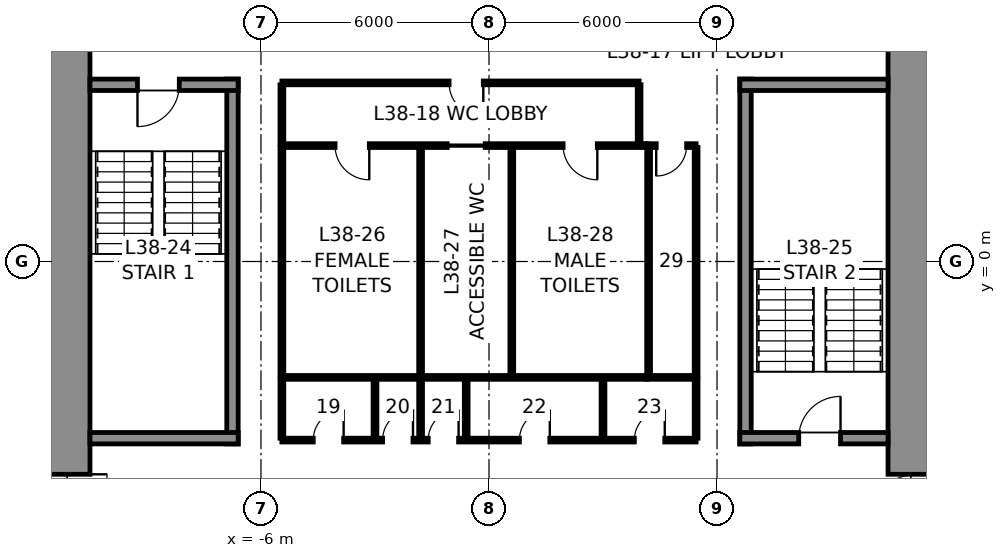
"""IFC4 building model, lengths in metres.
Left out: names, types, materials, properties, quantities, classifications, styles, units other than length and angle.
Written with IfcOpenShell. Run it as: python <this file> out.ifc"""

import sys

from ifc_helpers import new_model, si_unit, direction, frame, frame_2d, origin, place, context, subcontext, project, spatial, rectangle, extrude, element, fill, save


model = new_model("IFC4")
c1 = context("Model", 3, precision=1e-05, world=origin(), true_north=direction((0.0, 1.0)))
c2 = subcontext(c1, "Body", "Model", "MODEL_VIEW")
j1 = project(units=[si_unit("LENGTHUNIT", "METRE"), si_unit("PLANEANGLEUNIT", "RADIAN")], contexts=[c1])
p1 = place(None, origin())
s1 = spatial("IfcSite", under=j1, at=p1, CompositionType="ELEMENT")
p2 = place(p1, origin())
s2 = spatial("IfcBuilding", under=s1, at=p2, CompositionType="ELEMENT")
p3 = place(p2, frame((0.0, 0.0, 179.8)))
s3 = spatial("IfcBuildingStorey", under=s2, at=p3, CompositionType="ELEMENT", Elevation=179.8)
p4 = place(p3, frame((11.25, 10.5, 0.0), z_axis=(0.0, 0.0, 1.0), x_axis=(0.0, -1.0, 0.0)))
e1 = element("IfcWall", 1, at=p4, inside=s3, PredefinedType="SHEAR", context=c2, shape_type="SweptSolid", body=[
    extrude(rectangle(XDim=21.0, YDim=1.5, at=frame_2d((10.5, 0.0))), origin(), (0.0, 0.0, 1.0), 4.0),
])
p5 = place(p4, frame((3.7, 0.0, 0.0)))
e2 = element("IfcOpeningElement", 2, at=p5, cuts=e1, PredefinedType="OPENING", context=c2, shape_type="SweptSolid", body=[
    extrude(rectangle(XDim=1.2, YDim=2.3, at=frame_2d((0.6, 1.15))), frame((0.0, 0.76, 0.0), z_axis=(0.0, -1.0, 0.0), x_axis=(1.0, 0.0, 0.0)), (0.0, 0.0, 1.0), 1.52),
])
p6 = place(p4, frame((16.1, 0.0, 0.0)))
e3 = element("IfcOpeningElement", 3, at=p6, cuts=e1, PredefinedType="OPENING", context=c2, shape_type="SweptSolid", body=[
    extrude(rectangle(XDim=1.2, YDim=2.3, at=frame_2d((0.6, 1.15))), frame((0.0, 0.76, 0.0), z_axis=(0.0, -1.0, 0.0), x_axis=(1.0, 0.0, 0.0)), (0.0, 0.0, 1.0), 1.52),
])
p7 = place(p3, frame((-11.25, -10.5, 0.0), z_axis=(0.0, 0.0, 1.0), x_axis=(0.0, 1.0, 0.0)))
e4 = element("IfcWall", 4, at=p7, inside=s3, PredefinedType="SHEAR", context=c2, shape_type="SweptSolid", body=[
    extrude(rectangle(XDim=21.0, YDim=1.5, at=frame_2d((10.5, 0.0))), origin(), (0.0, 0.0, 1.0), 4.0),
])
p8 = place(p7, frame((16.1, 0.0, 0.0)))
e5 = element("IfcOpeningElement", 5, at=p8, cuts=e4, PredefinedType="OPENING", context=c2, shape_type="SweptSolid", body=[
    extrude(rectangle(XDim=1.2, YDim=2.3, at=frame_2d((0.6, 1.15))), frame((0.0, 0.76, 0.0), z_axis=(0.0, -1.0, 0.0), x_axis=(1.0, 0.0, 0.0)), (0.0, 0.0, 1.0), 1.52),
])
p9 = place(p7, frame((3.7, 0.0, 0.0)))
e6 = element("IfcOpeningElement", 6, at=p9, cuts=e4, PredefinedType="OPENING", context=c2, shape_type="SweptSolid", body=[
    extrude(rectangle(XDim=1.2, YDim=2.3, at=frame_2d((0.6, 1.15))), frame((0.0, 0.76, 0.0), z_axis=(0.0, -1.0, 0.0), x_axis=(1.0, 0.0, 0.0)), (0.0, 0.0, 1.0), 1.52),
])
p10 = place(p3, frame((-6.75, -4.8, 0.0), z_axis=(0.0, 0.0, 1.0), x_axis=(0.0, 1.0, 0.0)))
e7 = element("IfcWall", 7, at=p10, inside=s3, PredefinedType="SOLIDWALL", context=c2, shape_type="SweptSolid", body=[
    extrude(rectangle(XDim=9.6, YDim=0.3, at=frame_2d((4.8, 0.0))), origin(), (0.0, 0.0, 1.0), 3.75),
])
p11 = place(p3, frame((-10.5, 4.65, 0.0), z_axis=(0.0, 0.0, 1.0), x_axis=(1.0, 0.0, 0.0)))
e8 = element("IfcWall", 8, at=p11, inside=s3, PredefinedType="SOLIDWALL", context=c2, shape_type="SweptSolid", body=[
    extrude(rectangle(XDim=3.9, YDim=0.3, at=frame_2d((1.95, 0.0))), origin(), (0.0, 0.0, 1.0), 3.75),
])
p12 = place(p11, frame((1.25, 0.0, 0.0)))
e9 = element("IfcOpeningElement", 9, at=p12, cuts=e8, PredefinedType="OPENING", context=c2, shape_type="SweptSolid", body=[
    extrude(rectangle(XDim=1.1, YDim=2.3, at=frame_2d((0.55, 1.15))), frame((0.0, 0.16, 0.0), z_axis=(0.0, -1.0, 0.0), x_axis=(1.0, 0.0, 0.0)), (0.0, 0.0, 1.0), 0.32),
])
p13 = place(p3, frame((-6.6, -4.65, 0.0), z_axis=(0.0, 0.0, 1.0), x_axis=(-1.0, 0.0, 0.0)))
e10 = element("IfcWall", 10, at=p13, inside=s3, PredefinedType="SOLIDWALL", context=c2, shape_type="SweptSolid", body=[
    extrude(rectangle(XDim=3.9, YDim=0.3, at=frame_2d((1.95, 0.0))), origin(), (0.0, 0.0, 1.0), 3.75),
])
p14 = place(p3, frame((6.75, -4.8, 0.0), z_axis=(0.0, 0.0, 1.0), x_axis=(0.0, 1.0, 0.0)))
e11 = element("IfcWall", 11, at=p14, inside=s3, PredefinedType="SOLIDWALL", context=c2, shape_type="SweptSolid", body=[
    extrude(rectangle(XDim=9.6, YDim=0.3, at=frame_2d((4.8, 0.0))), origin(), (0.0, 0.0, 1.0), 3.75),
])
p15 = place(p3, frame((6.6, 4.65, 0.0), z_axis=(0.0, 0.0, 1.0), x_axis=(1.0, 0.0, 0.0)))
e12 = element("IfcWall", 12, at=p15, inside=s3, PredefinedType="SOLIDWALL", context=c2, shape_type="SweptSolid", body=[
    extrude(rectangle(XDim=3.9, YDim=0.3, at=frame_2d((1.95, 0.0))), origin(), (0.0, 0.0, 1.0), 3.75),
])
p16 = place(p3, frame((10.5, -4.65, 0.0), z_axis=(0.0, 0.0, 1.0), x_axis=(-1.0, 0.0, 0.0)))
e13 = element("IfcWall", 13, at=p16, inside=s3, PredefinedType="SOLIDWALL", context=c2, shape_type="SweptSolid", body=[
    extrude(rectangle(XDim=3.9, YDim=0.3, at=frame_2d((1.95, 0.0))), origin(), (0.0, 0.0, 1.0), 3.75),
])
p17 = place(p16, frame((1.25, 0.0, 0.0)))
e14 = element("IfcOpeningElement", 14, at=p17, cuts=e13, PredefinedType="OPENING", context=c2, shape_type="SweptSolid", body=[
    extrude(rectangle(XDim=1.1, YDim=2.3, at=frame_2d((0.55, 1.15))), frame((0.0, 0.16, 0.0), z_axis=(0.0, -1.0, 0.0), x_axis=(1.0, 0.0, 0.0)), (0.0, 0.0, 1.0), 0.32),
])
p18 = place(p3, frame((-5.45, 3.05, 0.0), z_axis=(0.0, 0.0, 1.0), x_axis=(1.0, 0.0, 0.0)))
e15 = element("IfcWall", 15, at=p18, inside=s3, PredefinedType="PARTITIONING", context=c2, shape_type="SweptSolid", body=[
    extrude(rectangle(XDim=9.6, YDim=0.1, at=frame_2d((4.8, 0.0))), origin(), (0.0, 0.0, 1.0), 3.75),
])
p19 = place(p18, frame((1.4, 0.0, 0.0)))
e16 = element("IfcOpeningElement", 16, at=p19, cuts=e15, PredefinedType="OPENING", context=c2, shape_type="SweptSolid", body=[
    extrude(rectangle(XDim=0.9, YDim=2.3, at=frame_2d((0.45, 1.15))), frame((0.0, 0.06, 0.0), z_axis=(0.0, -1.0, 0.0), x_axis=(1.0, 0.0, 0.0)), (0.0, 0.0, 1.0), 0.12),
])
p20 = place(p18, frame((4.35, 0.0, 0.0)))
e17 = element("IfcOpeningElement", 17, at=p20, cuts=e15, PredefinedType="OPENING", context=c2, shape_type="SweptSolid", body=[
    extrude(rectangle(XDim=1.0, YDim=2.3, at=frame_2d((0.5, 1.15))), frame((0.0, 0.06, 0.0), z_axis=(0.0, -1.0, 0.0), x_axis=(1.0, 0.0, 0.0)), (0.0, 0.0, 1.0), 0.12),
])
p21 = place(p18, frame((7.4, 0.0, 0.0)))
e18 = element("IfcOpeningElement", 18, at=p21, cuts=e15, PredefinedType="OPENING", context=c2, shape_type="SweptSolid", body=[
    extrude(rectangle(XDim=0.9, YDim=2.3, at=frame_2d((0.45, 1.15))), frame((0.0, 0.06, 0.0), z_axis=(0.0, -1.0, 0.0), x_axis=(1.0, 0.0, 0.0)), (0.0, 0.0, 1.0), 0.12),
])
p22 = place(p3, frame((4.15, 3.05, 0.0), z_axis=(0.0, 0.0, 1.0), x_axis=(1.0, 0.0, 0.0)))
e19 = element("IfcWall", 19, at=p22, inside=s3, PredefinedType="PARTITIONING", context=c2, shape_type="SweptSolid", body=[
    extrude(rectangle(XDim=1.3, YDim=0.1, at=frame_2d((0.65, 0.0))), origin(), (0.0, 0.0, 1.0), 3.75),
])
p23 = place(p22, frame((0.25, 0.0, 0.0)))
e20 = element("IfcOpeningElement", 20, at=p23, cuts=e19, PredefinedType="OPENING", context=c2, shape_type="SweptSolid", body=[
    extrude(rectangle(XDim=0.8, YDim=2.3, at=frame_2d((0.4, 1.15))), frame((0.0, 0.06, 0.0), z_axis=(0.0, -1.0, 0.0), x_axis=(1.0, 0.0, 0.0)), (0.0, 0.0, 1.0), 0.12),
])
p24 = place(p3, frame((4.15, -3.05, 0.0), z_axis=(0.0, 0.0, 1.0), x_axis=(-1.0, 0.0, 0.0)))
e21 = element("IfcWall", 21, at=p24, inside=s3, PredefinedType="PARTITIONING", context=c2, shape_type="SweptSolid", body=[
    extrude(rectangle(XDim=9.6, YDim=0.1, at=frame_2d((4.8, 0.0))), origin(), (0.0, 0.0, 1.0), 3.75),
])
p25 = place(p3, frame((5.45, -3.05, 0.0), z_axis=(0.0, 0.0, 1.0), x_axis=(-1.0, 0.0, 0.0)))
e22 = element("IfcWall", 22, at=p25, inside=s3, PredefinedType="PARTITIONING", context=c2, shape_type="SweptSolid", body=[
    extrude(rectangle(XDim=1.3, YDim=0.1, at=frame_2d((0.65, 0.0))), origin(), (0.0, 0.0, 1.0), 3.75),
])
for number, where, z_axis, x_axis in (
    (23, (5.45, 3.0, 0.0), (0.0, 0.0, 1.0), (0.0, -1.0, 0.0)),
    (24, (-5.45, -3.0, 0.0), (0.0, 0.0, 1.0), (0.0, 1.0, 0.0)),
    (25, (-1.8, -3.0, 0.0), (0.0, 0.0, 1.0), (0.0, 1.0, 0.0)),
    (26, (0.6, -3.0, 0.0), (0.0, 0.0, 1.0), (0.0, 1.0, 0.0)),
    (27, (4.2, -3.0, 0.0), (0.0, 0.0, 1.0), (0.0, 1.0, 0.0)),
):
    element("IfcWall", number, at=place(p3, frame(where, z_axis=z_axis, x_axis=x_axis)), inside=s3, PredefinedType="PARTITIONING", context=c2, shape_type="SweptSolid", body=[
        extrude(rectangle(XDim=6.0, YDim=0.1, at=frame_2d((3.0, 0.0))), origin(), (0.0, 0.0, 1.0), 3.75),
    ])
p26 = place(p3, frame((-5.45, 4.7, 0.0), z_axis=(0.0, 0.0, 1.0), x_axis=(1.0, 0.0, 0.0)))
e28 = element("IfcWall", 28, at=p26, inside=s3, PredefinedType="PARTITIONING", context=c2, shape_type="SweptSolid", body=[
    extrude(rectangle(XDim=9.4, YDim=0.1, at=frame_2d((4.7, 0.0))), origin(), (0.0, 0.0, 1.0), 3.75),
])
p27 = place(p26, frame((4.4, 0.0, 0.0)))
e29 = element("IfcOpeningElement", 29, at=p27, cuts=e28, PredefinedType="OPENING", context=c2, shape_type="SweptSolid", body=[
    extrude(rectangle(XDim=0.9, YDim=2.3, at=frame_2d((0.45, 1.15))), frame((0.0, 0.06, 0.0), z_axis=(0.0, -1.0, 0.0), x_axis=(1.0, 0.0, 0.0)), (0.0, 0.0, 1.0), 0.12),
])
for number, where, z_axis, x_axis in (
    (30, (-5.45, 3.1, 0.0), (0.0, 0.0, 1.0), (0.0, 1.0, 0.0)),
    (31, (3.95, 3.1, 0.0), (0.0, 0.0, 1.0), (0.0, 1.0, 0.0)),
):
    element("IfcWall", number, at=place(p3, frame(where, z_axis=z_axis, x_axis=x_axis)), inside=s3, PredefinedType="PARTITIONING", context=c2, shape_type="SweptSolid", body=[
        extrude(rectangle(XDim=1.55, YDim=0.1, at=frame_2d((0.775, 0.0))), origin(), (0.0, 0.0, 1.0), 3.75),
    ])
p28 = place(p3, frame((5.45, -4.7, 0.0), z_axis=(0.0, 0.0, 1.0), x_axis=(-1.0, 0.0, 0.0)))
e32 = element("IfcWall", 32, at=p28, inside=s3, PredefinedType="PARTITIONING", context=c2, shape_type="SweptSolid", body=[
    extrude(rectangle(XDim=10.9, YDim=0.1, at=frame_2d((5.45, 0.0))), origin(), (0.0, 0.0, 1.0), 3.75),
])
p29 = place(p28, frame((9.275, 0.0, 0.0)))
e33 = element("IfcOpeningElement", 33, at=p29, cuts=e32, PredefinedType="OPENING", context=c2, shape_type="SweptSolid", body=[
    extrude(rectangle(XDim=0.8, YDim=2.3, at=frame_2d((0.4, 1.15))), frame((0.0, 0.06, 0.0), z_axis=(0.0, -1.0, 0.0), x_axis=(1.0, 0.0, 0.0)), (0.0, 0.0, 1.0), 0.12),
])
p30 = place(p28, frame((7.45, 0.0, 0.0)))
e34 = element("IfcOpeningElement", 34, at=p30, cuts=e32, PredefinedType="OPENING", context=c2, shape_type="SweptSolid", body=[
    extrude(rectangle(XDim=0.8, YDim=2.3, at=frame_2d((0.4, 1.15))), frame((0.0, 0.06, 0.0), z_axis=(0.0, -1.0, 0.0), x_axis=(1.0, 0.0, 0.0)), (0.0, 0.0, 1.0), 0.12),
])
p31 = place(p28, frame((6.25, 0.0, 0.0)))
e35 = element("IfcOpeningElement", 35, at=p31, cuts=e32, PredefinedType="OPENING", context=c2, shape_type="SweptSolid", body=[
    extrude(rectangle(XDim=0.8, YDim=2.3, at=frame_2d((0.4, 1.15))), frame((0.0, 0.06, 0.0), z_axis=(0.0, -1.0, 0.0), x_axis=(1.0, 0.0, 0.0)), (0.0, 0.0, 1.0), 0.12),
])
p32 = place(p28, frame((3.85, 0.0, 0.0)))
e36 = element("IfcOpeningElement", 36, at=p32, cuts=e32, PredefinedType="OPENING", context=c2, shape_type="SweptSolid", body=[
    extrude(rectangle(XDim=0.8, YDim=2.3, at=frame_2d((0.4, 1.15))), frame((0.0, 0.06, 0.0), z_axis=(0.0, -1.0, 0.0), x_axis=(1.0, 0.0, 0.0)), (0.0, 0.0, 1.0), 0.12),
])
p33 = place(p28, frame((0.825, 0.0, 0.0)))
e37 = element("IfcOpeningElement", 37, at=p33, cuts=e32, PredefinedType="OPENING", context=c2, shape_type="SweptSolid", body=[
    extrude(rectangle(XDim=0.8, YDim=2.3, at=frame_2d((0.4, 1.15))), frame((0.0, 0.06, 0.0), z_axis=(0.0, -1.0, 0.0), x_axis=(1.0, 0.0, 0.0)), (0.0, 0.0, 1.0), 0.12),
])
for number, where, z_axis, x_axis in (
    (38, (-5.45, -3.1, 0.0), (0.0, 0.0, 1.0), (0.0, -1.0, 0.0)),
    (39, (5.45, -3.1, 0.0), (0.0, 0.0, 1.0), (0.0, -1.0, 0.0)),
    (40, (-3.0, -3.1, 0.0), (0.0, 0.0, 1.0), (0.0, -1.0, 0.0)),
    (41, (-1.8, -3.1, 0.0), (0.0, 0.0, 1.0), (0.0, -1.0, 0.0)),
    (42, (-0.6, -3.1, 0.0), (0.0, 0.0, 1.0), (0.0, -1.0, 0.0)),
    (43, (3.0, -3.1, 0.0), (0.0, 0.0, 1.0), (0.0, -1.0, 0.0)),
):
    element("IfcWall", number, at=place(p3, frame(where, z_axis=z_axis, x_axis=x_axis)), inside=s3, PredefinedType="PARTITIONING", context=c2, shape_type="SweptSolid", body=[
        extrude(rectangle(XDim=1.55, YDim=0.1, at=frame_2d((0.775, 0.0))), origin(), (0.0, 0.0, 1.0), 3.75),
    ])
p34 = place(p12, frame((1.1, 0.0, 0.0), z_axis=(0.0, 0.0, 1.0), x_axis=(-1.0, 0.0, 0.0)))
e44 = element("IfcDoor", 44, at=p34, inside=s3, OperationType="SINGLE_SWING_RIGHT", PredefinedType="DOOR", context=c2, shape_type="SweptSolid", body=[
    extrude(rectangle(XDim=1.1, YDim=2.3, at=frame_2d((0.55, 1.15))), frame((0.0, 0.025, 0.0), z_axis=(0.0, -1.0, 0.0), x_axis=(1.0, 0.0, 0.0)), (0.0, 0.0, 1.0), 0.05),
])
fill(e9, e44)
p35 = place(p17, frame((1.1, 0.0, 0.0), z_axis=(0.0, 0.0, 1.0), x_axis=(-1.0, 0.0, 0.0)))
e45 = element("IfcDoor", 45, at=p35, inside=s3, OperationType="SINGLE_SWING_RIGHT", PredefinedType="DOOR", context=c2, shape_type="SweptSolid", body=[
    extrude(rectangle(XDim=1.1, YDim=2.3, at=frame_2d((0.55, 1.15))), frame((0.0, 0.025, 0.0), z_axis=(0.0, -1.0, 0.0), x_axis=(1.0, 0.0, 0.0)), (0.0, 0.0, 1.0), 0.05),
])
fill(e14, e45)
p36 = place(p19, frame((0.9, 0.0, 0.0), z_axis=(0.0, 0.0, 1.0), x_axis=(-1.0, 0.0, 0.0)))
e46 = element("IfcDoor", 46, at=p36, inside=s3, OperationType="SINGLE_SWING_LEFT", PredefinedType="DOOR", context=c2, shape_type="SweptSolid", body=[
    extrude(rectangle(XDim=0.9, YDim=2.3, at=frame_2d((0.45, 1.15))), frame((0.0, 0.025, 0.0), z_axis=(0.0, -1.0, 0.0), x_axis=(1.0, 0.0, 0.0)), (0.0, 0.0, 1.0), 0.05),
])
fill(e16, e46)
p37 = place(p20, frame((1.0, 0.0, 0.0), z_axis=(0.0, 0.0, 1.0), x_axis=(-1.0, 0.0, 0.0)))
e47 = element("IfcDoor", 47, at=p37, inside=s3, OperationType="SLIDING_TO_LEFT", PredefinedType="DOOR", context=c2, shape_type="SweptSolid", body=[
    extrude(rectangle(XDim=1.0, YDim=2.3, at=frame_2d((0.5, 1.15))), frame((0.0, 0.025, 0.0), z_axis=(0.0, -1.0, 0.0), x_axis=(1.0, 0.0, 0.0)), (0.0, 0.0, 1.0), 0.05),
])
fill(e17, e47)
p38 = place(p21, frame((0.9, 0.0, 0.0), z_axis=(0.0, 0.0, 1.0), x_axis=(-1.0, 0.0, 0.0)))
e48 = element("IfcDoor", 48, at=p38, inside=s3, OperationType="SINGLE_SWING_LEFT", PredefinedType="DOOR", context=c2, shape_type="SweptSolid", body=[
    extrude(rectangle(XDim=0.9, YDim=2.3, at=frame_2d((0.45, 1.15))), frame((0.0, 0.025, 0.0), z_axis=(0.0, -1.0, 0.0), x_axis=(1.0, 0.0, 0.0)), (0.0, 0.0, 1.0), 0.05),
])
fill(e18, e48)
p39 = place(p23, frame((0.8, 0.0, 0.0), z_axis=(0.0, 0.0, 1.0), x_axis=(-1.0, 0.0, 0.0)))
e49 = element("IfcDoor", 49, at=p39, inside=s3, OperationType="SINGLE_SWING_RIGHT", PredefinedType="DOOR", context=c2, shape_type="SweptSolid", body=[
    extrude(rectangle(XDim=0.8, YDim=2.3, at=frame_2d((0.4, 1.15))), frame((0.0, 0.025, 0.0), z_axis=(0.0, -1.0, 0.0), x_axis=(1.0, 0.0, 0.0)), (0.0, 0.0, 1.0), 0.05),
])
fill(e20, e49)
p40 = place(p27, frame((0.9, 0.0, 0.0), z_axis=(0.0, 0.0, 1.0), x_axis=(-1.0, 0.0, 0.0)))
e50 = element("IfcDoor", 50, at=p40, inside=s3, OperationType="SINGLE_SWING_LEFT", PredefinedType="DOOR", context=c2, shape_type="SweptSolid", body=[
    extrude(rectangle(XDim=0.9, YDim=2.3, at=frame_2d((0.45, 1.15))), frame((0.0, 0.025, 0.0), z_axis=(0.0, -1.0, 0.0), x_axis=(1.0, 0.0, 0.0)), (0.0, 0.0, 1.0), 0.05),
])
fill(e29, e50)
p41 = place(p29, frame((0.8, 0.0, 0.0), z_axis=(0.0, 0.0, 1.0), x_axis=(-1.0, 0.0, 0.0)))
e51 = element("IfcDoor", 51, at=p41, inside=s3, OperationType="SINGLE_SWING_RIGHT", PredefinedType="DOOR", context=c2, shape_type="SweptSolid", body=[
    extrude(rectangle(XDim=0.8, YDim=2.3, at=frame_2d((0.4, 1.15))), frame((0.0, 0.025, 0.0), z_axis=(0.0, -1.0, 0.0), x_axis=(1.0, 0.0, 0.0)), (0.0, 0.0, 1.0), 0.05),
])
fill(e33, e51)
p42 = place(p30, frame((0.8, 0.0, 0.0), z_axis=(0.0, 0.0, 1.0), x_axis=(-1.0, 0.0, 0.0)))
e52 = element("IfcDoor", 52, at=p42, inside=s3, OperationType="SINGLE_SWING_RIGHT", PredefinedType="DOOR", context=c2, shape_type="SweptSolid", body=[
    extrude(rectangle(XDim=0.8, YDim=2.3, at=frame_2d((0.4, 1.15))), frame((0.0, 0.025, 0.0), z_axis=(0.0, -1.0, 0.0), x_axis=(1.0, 0.0, 0.0)), (0.0, 0.0, 1.0), 0.05),
])
fill(e34, e52)
p43 = place(p31, frame((0.8, 0.0, 0.0), z_axis=(0.0, 0.0, 1.0), x_axis=(-1.0, 0.0, 0.0)))
e53 = element("IfcDoor", 53, at=p43, inside=s3, OperationType="SINGLE_SWING_RIGHT", PredefinedType="DOOR", context=c2, shape_type="SweptSolid", body=[
    extrude(rectangle(XDim=0.8, YDim=2.3, at=frame_2d((0.4, 1.15))), frame((0.0, 0.025, 0.0), z_axis=(0.0, -1.0, 0.0), x_axis=(1.0, 0.0, 0.0)), (0.0, 0.0, 1.0), 0.05),
])
fill(e35, e53)
p44 = place(p32, frame((0.8, 0.0, 0.0), z_axis=(0.0, 0.0, 1.0), x_axis=(-1.0, 0.0, 0.0)))
e54 = element("IfcDoor", 54, at=p44, inside=s3, OperationType="SINGLE_SWING_RIGHT", PredefinedType="DOOR", context=c2, shape_type="SweptSolid", body=[
    extrude(rectangle(XDim=0.8, YDim=2.3, at=frame_2d((0.4, 1.15))), frame((0.0, 0.025, 0.0), z_axis=(0.0, -1.0, 0.0), x_axis=(1.0, 0.0, 0.0)), (0.0, 0.0, 1.0), 0.05),
])
fill(e36, e54)
p45 = place(p33, frame((0.8, 0.0, 0.0), z_axis=(0.0, 0.0, 1.0), x_axis=(-1.0, 0.0, 0.0)))
e55 = element("IfcDoor", 55, at=p45, inside=s3, OperationType="SINGLE_SWING_RIGHT", PredefinedType="DOOR", context=c2, shape_type="SweptSolid", body=[
    extrude(rectangle(XDim=0.8, YDim=2.3, at=frame_2d((0.4, 1.15))), frame((0.0, 0.025, 0.0), z_axis=(0.0, -1.0, 0.0), x_axis=(1.0, 0.0, 0.0)), (0.0, 0.0, 1.0), 0.05),
])
fill(e37, e55)
p46 = place(p9, frame((1.2, 0.0, 0.0), z_axis=(0.0, 0.0, 1.0), x_axis=(-1.0, 0.0, 0.0)))
e56 = element("IfcDoor", 56, at=p46, inside=s3, OperationType="SINGLE_SWING_LEFT", PredefinedType="DOOR", context=c2, shape_type="SweptSolid", body=[
    extrude(rectangle(XDim=1.2, YDim=2.3, at=frame_2d((0.6, 1.15))), frame((0.0, 0.025, 0.0), z_axis=(0.0, -1.0, 0.0), x_axis=(1.0, 0.0, 0.0)), (0.0, 0.0, 1.0), 0.05),
])
fill(e6, e56)
p47 = place(p6, frame((1.2, 0.0, 0.0), z_axis=(0.0, 0.0, 1.0), x_axis=(-1.0, 0.0, 0.0)))
e57 = element("IfcDoor", 57, at=p47, inside=s3, OperationType="SINGLE_SWING_LEFT", PredefinedType="DOOR", context=c2, shape_type="SweptSolid", body=[
    extrude(rectangle(XDim=1.2, YDim=2.3, at=frame_2d((0.6, 1.15))), frame((0.0, 0.025, 0.0), z_axis=(0.0, -1.0, 0.0), x_axis=(1.0, 0.0, 0.0)), (0.0, 0.0, 1.0), 0.05),
])
fill(e3, e57)
save(model, sys.argv[1])
